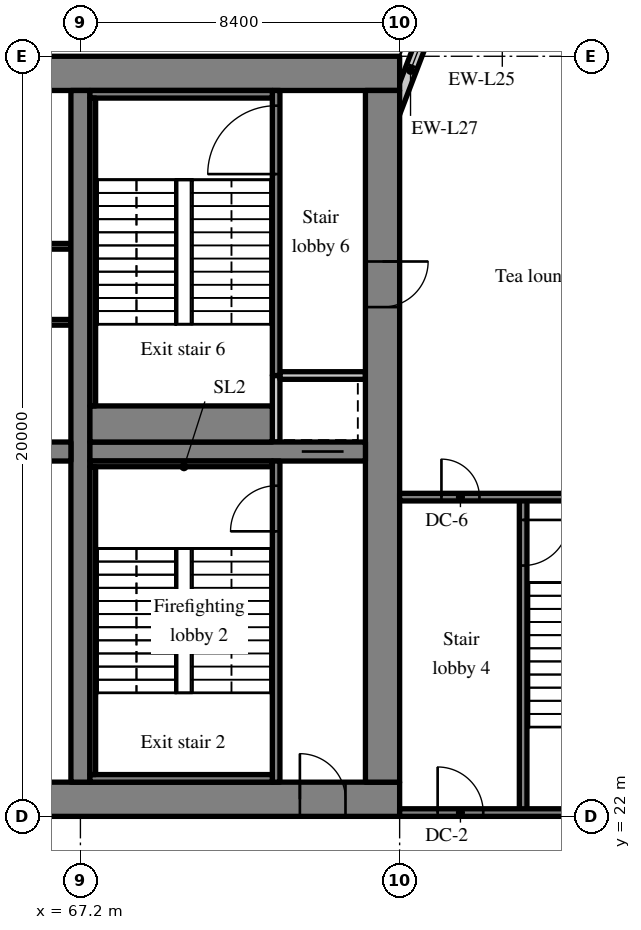
"""IFC4 building model, lengths in metres.
Left out: names, types, materials, properties, quantities, classifications, styles, units other than length and angle.
Written with IfcOpenShell. Run it as: python <this file> out.ifc"""

import sys

from ifc_helpers import new_model, si_unit, direction, frame, frame_2d, origin, place, context, subcontext, project, spatial, rectangle, extrude, source, transform, mapped, element, fill, save


model = new_model("IFC4")
c1 = context("Model", 3, precision=1e-05, world=origin(), true_north=direction((0.0, 1.0)))
c2 = subcontext(c1, "Body", "Model", "MODEL_VIEW")
j1 = project(units=[si_unit("LENGTHUNIT", "METRE"), si_unit("PLANEANGLEUNIT", "RADIAN")], contexts=[c1])
p1 = place(None, origin())
s1 = spatial("IfcSite", under=j1, at=p1, CompositionType="ELEMENT")
p2 = place(p1, origin())
s2 = spatial("IfcBuilding", under=s1, at=p2, CompositionType="ELEMENT")
p3 = place(p2, frame((0.0, 0.0, 118.0)))
s3 = spatial("IfcBuildingStorey", under=s2, at=p3, CompositionType="ELEMENT", Elevation=118.0)
m1 = source(origin(), c2, "Body", "SweptSolid", [
    extrude(rectangle(XDim=50.4, YDim=0.9, at=frame_2d((25.2, 0.0))), origin(), (0.0, 0.0, 1.0), 3.52),
])
p4 = place(p3, frame((25.2, 22.45, 0.0), z_axis=(0.0, 0.0, 1.0), x_axis=(1.0, 0.0, 0.0)))
e1 = element("IfcWall", 1, at=p4, inside=s3, PredefinedType="SHEAR", context=c2, shape_type="MappedRepresentation", body=[
    mapped(m1, transform((0.0, 0.0, 0.0), scale=1.0)),
])
m2 = source(origin(), c2, "Body", "SweptSolid", [
    extrude(rectangle(XDim=1.8, YDim=2.1, at=frame_2d((0.9, 1.05))), frame((0.0, 0.46, 0.0), z_axis=(0.0, -1.0, 0.0), x_axis=(1.0, 0.0, 0.0)), (0.0, 0.0, 1.0), 0.92),
])
p5 = place(p4, frame((15.9, 0.0, 0.0)))
e2 = element("IfcOpeningElement", 2, at=p5, cuts=e1, PredefinedType="OPENING", context=c2, shape_type="MappedRepresentation", body=[
    mapped(m2, transform((0.0, 0.0, 0.0), scale=1.0)),
])
m3 = source(origin(), c2, "Body", "SweptSolid", [
    extrude(rectangle(XDim=1.2, YDim=2.1, at=frame_2d((0.6, 1.05))), frame((0.0, 0.46, 0.0), z_axis=(0.0, -1.0, 0.0), x_axis=(1.0, 0.0, 0.0)), (0.0, 0.0, 1.0), 0.92),
])
p6 = place(p4, frame((26.975, 0.0, 0.0)))
e3 = element("IfcOpeningElement", 3, at=p6, cuts=e1, PredefinedType="OPENING", context=c2, shape_type="MappedRepresentation", body=[
    mapped(m3, transform((0.0, 0.0, 0.0), scale=1.0)),
])
m4 = source(origin(), c2, "Body", "SweptSolid", [
    extrude(rectangle(XDim=0.9, YDim=2.1, at=frame_2d((0.45, 1.05))), frame((0.0, 0.46, 0.0), z_axis=(0.0, -1.0, 0.0), x_axis=(1.0, 0.0, 0.0)), (0.0, 0.0, 1.0), 0.92),
])
p7 = place(p4, frame((33.75, 0.0, 0.0)))
e4 = element("IfcOpeningElement", 4, at=p7, cuts=e1, PredefinedType="OPENING", context=c2, shape_type="MappedRepresentation", body=[
    mapped(m4, transform((0.0, 0.0, 0.0), scale=1.0)),
])
p8 = place(p4, frame((30.75, 0.0, 0.0)))
e5 = element("IfcOpeningElement", 5, at=p8, cuts=e1, PredefinedType="OPENING", context=c2, shape_type="MappedRepresentation", body=[
    mapped(m4, transform((0.0, 0.0, 0.0), scale=1.0)),
])
p9 = place(p4, frame((39.788, 0.0, 0.0)))
e6 = element("IfcOpeningElement", 6, at=p9, cuts=e1, PredefinedType="OPENING", context=c2, shape_type="MappedRepresentation", body=[
    mapped(m4, transform((0.0, 0.0, 0.0), scale=1.0)),
])
p10 = place(p4, frame((36.762, 0.0, 0.0)))
e7 = element("IfcOpeningElement", 7, at=p10, cuts=e1, PredefinedType="OPENING", context=c2, shape_type="MappedRepresentation", body=[
    mapped(m4, transform((0.0, 0.0, 0.0), scale=1.0)),
])
p11 = place(p4, frame((6.45, 0.0, 0.0)))
e8 = element("IfcOpeningElement", 8, at=p11, cuts=e1, PredefinedType="OPENING", context=c2, shape_type="MappedRepresentation", body=[
    mapped(m3, transform((0.0, 0.0, 0.0), scale=1.0)),
])
p12 = place(p4, frame((47.775, 0.0, 0.0)))
e9 = element("IfcOpeningElement", 9, at=p12, cuts=e1, PredefinedType="OPENING", context=c2, shape_type="MappedRepresentation", body=[
    mapped(m3, transform((0.0, 0.0, 0.0), scale=1.0)),
])
p13 = place(p3, frame((25.2, 41.55, 0.0), z_axis=(0.0, 0.0, 1.0), x_axis=(1.0, 0.0, 0.0)))
e10 = element("IfcWall", 10, at=p13, inside=s3, PredefinedType="SHEAR", context=c2, shape_type="MappedRepresentation", body=[
    mapped(m1, transform((0.0, 0.0, 0.0), scale=1.0)),
])
m5 = source(origin(), c2, "Body", "SweptSolid", [
    extrude(rectangle(XDim=18.2, YDim=0.9, at=frame_2d((9.1, 0.0))), origin(), (0.0, 0.0, 1.0), 3.52),
])
p14 = place(p3, frame((75.15, 22.9, 0.0), z_axis=(0.0, 0.0, 1.0), x_axis=(0.0, 1.0, 0.0)))
e11 = element("IfcWall", 11, at=p14, inside=s3, PredefinedType="SHEAR", context=c2, shape_type="MappedRepresentation", body=[
    mapped(m5, transform((0.0, 0.0, 0.0), scale=1.0)),
])
p15 = place(p14, frame((12.5, 0.0, 0.0)))
e12 = element("IfcOpeningElement", 12, at=p15, cuts=e11, PredefinedType="OPENING", context=c2, shape_type="MappedRepresentation", body=[
    mapped(m3, transform((0.0, 0.0, 0.0), scale=1.0)),
])
m6 = source(origin(), c2, "Body", "SweptSolid", [
    extrude(rectangle(XDim=18.2, YDim=0.5, at=frame_2d((9.1, 0.0))), origin(), (0.0, 0.0, 1.0), 3.52),
])
p16 = place(p3, frame((67.2, 22.9, 0.0), z_axis=(0.0, 0.0, 1.0), x_axis=(0.0, 1.0, 0.0)))
e13 = element("IfcWall", 13, at=p16, inside=s3, PredefinedType="SHEAR", context=c2, shape_type="MappedRepresentation", body=[
    mapped(m6, transform((0.0, 0.0, 0.0), scale=1.0)),
])
m7 = source(origin(), c2, "Body", "SweptSolid", [
    extrude(rectangle(XDim=16.3, YDim=0.5, at=frame_2d((8.15, 0.0))), origin(), (0.0, 0.0, 1.0), 3.52),
])
p17 = place(p3, frame((50.65, 31.6, 0.0), z_axis=(0.0, 0.0, 1.0), x_axis=(1.0, 0.0, 0.0)))
e14 = element("IfcWall", 14, at=p17, inside=s3, PredefinedType="SHEAR", context=c2, shape_type="MappedRepresentation", body=[
    mapped(m7, transform((0.0, 0.0, 0.0), scale=1.0)),
])
m8 = source(origin(), c2, "Body", "SweptSolid", [
    extrude(rectangle(XDim=1.0, YDim=2.1, at=frame_2d((0.5, 1.05))), frame((0.0, 0.26, 0.0), z_axis=(0.0, -1.0, 0.0), x_axis=(1.0, 0.0, 0.0)), (0.0, 0.0, 1.0), 0.52),
])
p18 = place(p17, frame((0.575, 0.0, 0.0)))
e15 = element("IfcOpeningElement", 15, at=p18, cuts=e14, PredefinedType="OPENING", context=c2, shape_type="MappedRepresentation", body=[
    mapped(m8, transform((0.0, 0.0, 0.0), scale=1.0)),
])
m9 = source(origin(), c2, "Body", "SweptSolid", [
    extrude(rectangle(XDim=7.25, YDim=0.5, at=frame_2d((3.625, 0.0))), origin(), (0.0, 0.0, 1.0), 3.52),
])
p19 = place(p3, frame((67.45, 31.6, 0.0), z_axis=(0.0, 0.0, 1.0), x_axis=(1.0, 0.0, 0.0)))
e16 = element("IfcWall", 16, at=p19, inside=s3, PredefinedType="SHEAR", context=c2, shape_type="MappedRepresentation", body=[
    mapped(m9, transform((0.0, 0.0, 0.0), scale=1.0)),
])
m10 = source(origin(), c2, "Body", "SweptSolid", [
    extrude(rectangle(XDim=1.1, YDim=2.1, at=frame_2d((0.55, 1.05))), frame((0.0, 0.26, 0.0), z_axis=(0.0, -1.0, 0.0), x_axis=(1.0, 0.0, 0.0)), (0.0, 0.0, 1.0), 0.52),
])
p20 = place(p19, frame((5.575, 0.0, 0.0)))
e17 = element("IfcOpeningElement", 17, at=p20, cuts=e16, PredefinedType="OPENING", context=c2, shape_type="MappedRepresentation", body=[
    mapped(m10, transform((0.0, 0.0, 0.0), scale=1.0)),
])
m11 = source(origin(), c2, "Body", "SweptSolid", [
    extrude(rectangle(XDim=3.559, YDim=0.3, at=frame_2d((1.78, 0.0))), origin(), (0.0, 0.0, 1.0), 3.52),
])
p21 = place(p3, frame((76.523, 43.292, 0.0), z_axis=(0.0, 0.0, 1.0), x_axis=(-0.35779745313, -0.933799219604, 0.0)))
e18 = element("IfcWall", 18, at=p21, inside=s3, PredefinedType="SOLIDWALL", context=c2, shape_type="MappedRepresentation", body=[
    mapped(m11, transform((0.0, 0.0, 0.0), scale=1.0)),
])
m12 = source(origin(), c2, "Body", "SweptSolid", [
    extrude(rectangle(XDim=1.5, YDim=2.0, at=frame_2d((0.75, 1.0))), frame((0.0, 0.16, 0.0), z_axis=(0.0, -1.0, 0.0), x_axis=(1.0, 0.0, 0.0)), (0.0, 0.0, 1.0), 0.32),
])
p22 = place(p21, frame((0.156, 0.0, 0.9)))
e19 = element("IfcOpeningElement", 19, at=p22, cuts=e18, PredefinedType="OPENING", context=c2, shape_type="MappedRepresentation", body=[
    mapped(m12, transform((0.0, 0.0, 0.0), scale=1.0)),
])
m13 = source(origin(), c2, "Body", "SweptSolid", [
    extrude(rectangle(XDim=14.15, YDim=0.15, at=frame_2d((7.075, 0.0))), origin(), (0.0, 0.0, 1.0), 3.52),
])
p23 = place(p3, frame((66.95, 35.0, 0.0), z_axis=(0.0, 0.0, 1.0), x_axis=(-1.0, 0.0, 0.0)))
e20 = element("IfcWall", 20, at=p23, inside=s3, PredefinedType="PARTITIONING", context=c2, shape_type="MappedRepresentation", body=[
    mapped(m13, transform((0.0, 0.0, 0.0), scale=1.0)),
])
m14 = source(origin(), c2, "Body", "SweptSolid", [
    extrude(rectangle(XDim=0.9, YDim=2.1, at=frame_2d((0.45, 1.05))), frame((0.0, 0.085, 0.0), z_axis=(0.0, -1.0, 0.0), x_axis=(1.0, 0.0, 0.0)), (0.0, 0.0, 1.0), 0.17),
])
p24 = place(p23, frame((2.013, 0.0, 0.0)))
e21 = element("IfcOpeningElement", 21, at=p24, cuts=e20, PredefinedType="OPENING", context=c2, shape_type="MappedRepresentation", body=[
    mapped(m14, transform((0.0, 0.0, 0.0), scale=1.0)),
])
p25 = place(p23, frame((9.051, 0.0, 0.0)))
e22 = element("IfcOpeningElement", 22, at=p25, cuts=e20, PredefinedType="OPENING", context=c2, shape_type="MappedRepresentation", body=[
    mapped(m14, transform((0.0, 0.0, 0.0), scale=1.0)),
])
m15 = source(origin(), c2, "Body", "SweptSolid", [
    extrude(rectangle(XDim=16.3, YDim=0.15, at=frame_2d((8.15, 0.0))), origin(), (0.0, 0.0, 1.0), 3.52),
])
p26 = place(p3, frame((66.95, 37.0, 0.0), z_axis=(0.0, 0.0, 1.0), x_axis=(-1.0, 0.0, 0.0)))
e23 = element("IfcWall", 23, at=p26, inside=s3, PredefinedType="PARTITIONING", context=c2, shape_type="MappedRepresentation", body=[
    mapped(m15, transform((0.0, 0.0, 0.0), scale=1.0)),
])
p27 = place(p26, frame((1.588, 0.0, 0.0)))
e24 = element("IfcOpeningElement", 24, at=p27, cuts=e23, PredefinedType="OPENING", context=c2, shape_type="MappedRepresentation", body=[
    mapped(m14, transform((0.0, 0.0, 0.0), scale=1.0)),
])
p28 = place(p26, frame((7.293, 0.0, 0.0)))
e25 = element("IfcOpeningElement", 25, at=p28, cuts=e23, PredefinedType="OPENING", context=c2, shape_type="MappedRepresentation", body=[
    mapped(m14, transform((0.0, 0.0, 0.0), scale=1.0)),
])
p29 = place(p26, frame((12.183, 0.0, 0.0)))
e26 = element("IfcOpeningElement", 26, at=p29, cuts=e23, PredefinedType="OPENING", context=c2, shape_type="MappedRepresentation", body=[
    mapped(m14, transform((0.0, 0.0, 0.0), scale=1.0)),
])
p30 = place(p26, frame((14.627, 0.0, 0.0)))
e27 = element("IfcOpeningElement", 27, at=p30, cuts=e23, PredefinedType="OPENING", context=c2, shape_type="MappedRepresentation", body=[
    mapped(m14, transform((0.0, 0.0, 0.0), scale=1.0)),
])
m16 = source(origin(), c2, "Body", "SweptSolid", [
    extrude(rectangle(XDim=8.45, YDim=0.2, at=frame_2d((4.225, 0.0))), origin(), (0.0, 0.0, 1.0), 3.52),
])
p31 = place(p3, frame((72.35, 22.9, 0.0), z_axis=(0.0, 0.0, 1.0), x_axis=(0.0, 1.0, 0.0)))
e28 = element("IfcWall", 28, at=p31, inside=s3, PredefinedType="SOLIDWALL", context=c2, shape_type="MappedRepresentation", body=[
    mapped(m16, transform((0.0, 0.0, 0.0), scale=1.0)),
])
m17 = source(origin(), c2, "Body", "SweptSolid", [
    extrude(rectangle(XDim=1.2, YDim=2.1, at=frame_2d((0.6, 1.05))), frame((0.0, 0.11, 0.0), z_axis=(0.0, -1.0, 0.0), x_axis=(1.0, 0.0, 0.0)), (0.0, 0.0, 1.0), 0.22),
])
p32 = place(p31, frame((6.6, 0.0, 0.0)))
e29 = element("IfcOpeningElement", 29, at=p32, cuts=e28, PredefinedType="OPENING", context=c2, shape_type="MappedRepresentation", body=[
    mapped(m17, transform((0.0, 0.0, 0.0), scale=1.0)),
])
m18 = source(origin(), c2, "Body", "SweptSolid", [
    extrude(rectangle(XDim=1.75, YDim=0.2, at=frame_2d((0.875, 0.0))), origin(), (0.0, 0.0, 1.0), 3.52),
])
p33 = place(p3, frame((72.35, 31.85, 0.0), z_axis=(0.0, 0.0, 1.0), x_axis=(0.0, 1.0, 0.0)))
e30 = element("IfcWall", 30, at=p33, inside=s3, PredefinedType="SOLIDWALL", context=c2, shape_type="MappedRepresentation", body=[
    mapped(m18, transform((0.0, 0.0, 0.0), scale=1.0)),
])
m19 = source(origin(), c2, "Body", "SweptSolid", [
    extrude(rectangle(XDim=2.25, YDim=0.2, at=frame_2d((1.125, 0.0))), origin(), (0.0, 0.0, 1.0), 3.52),
])
p34 = place(p3, frame((72.45, 33.6, 0.0), z_axis=(0.0, 0.0, 1.0), x_axis=(1.0, 0.0, 0.0)))
e31 = element("IfcWall", 31, at=p34, inside=s3, PredefinedType="SOLIDWALL", context=c2, shape_type="MappedRepresentation", body=[
    mapped(m19, transform((0.0, 0.0, 0.0), scale=1.0)),
])
m20 = source(origin(), c2, "Body", "SweptSolid", [
    extrude(rectangle(XDim=7.5, YDim=0.2, at=frame_2d((3.75, 0.0))), origin(), (0.0, 0.0, 1.0), 3.52),
])
p35 = place(p3, frame((72.35, 33.6, 0.0), z_axis=(0.0, 0.0, 1.0), x_axis=(0.0, 1.0, 0.0)))
e32 = element("IfcWall", 32, at=p35, inside=s3, PredefinedType="SOLIDWALL", context=c2, shape_type="MappedRepresentation", body=[
    mapped(m20, transform((0.0, 0.0, 0.0), scale=1.0)),
])
m21 = source(origin(), c2, "Body", "SweptSolid", [
    extrude(rectangle(XDim=1.8, YDim=2.1, at=frame_2d((0.9, 1.05))), frame((0.0, 0.11, 0.0), z_axis=(0.0, -1.0, 0.0), x_axis=(1.0, 0.0, 0.0)), (0.0, 0.0, 1.0), 0.22),
])
p36 = place(p35, frame((5.3, 0.0, 0.0)))
e33 = element("IfcOpeningElement", 33, at=p36, cuts=e32, PredefinedType="OPENING", context=c2, shape_type="MappedRepresentation", body=[
    mapped(m21, transform((0.0, 0.0, 0.0), scale=1.0)),
])
m22 = source(origin(), c2, "Body", "SweptSolid", [
    extrude(rectangle(XDim=8.3, YDim=0.2, at=frame_2d((4.15, 0.0))), origin(), (0.0, 0.0, 1.0), 3.52),
])
p37 = place(p3, frame((78.85, 22.1, 0.0), z_axis=(0.0, 0.0, 1.0), x_axis=(0.0, 1.0, 0.0)))
e34 = element("IfcWall", 34, at=p37, inside=s3, PredefinedType="SOLIDWALL", context=c2, shape_type="MappedRepresentation", body=[
    mapped(m22, transform((0.0, 0.0, 0.0), scale=1.0)),
])
p38 = place(p37, frame((6.5, 0.0, 0.0)))
e35 = element("IfcOpeningElement", 35, at=p38, cuts=e34, PredefinedType="OPENING", context=c2, shape_type="MappedRepresentation", body=[
    mapped(m17, transform((0.0, 0.0, 0.0), scale=1.0)),
])
m23 = source(origin(), c2, "Body", "SweptSolid", [
    extrude(rectangle(XDim=8.225, YDim=0.2, at=frame_2d((4.112, 0.0))), origin(), (0.0, 0.0, 1.0), 3.52),
])
p39 = place(p3, frame((83.825, 22.1, 0.0), z_axis=(0.0, 0.0, 1.0), x_axis=(-1.0, 0.0, 0.0)))
e36 = element("IfcWall", 36, at=p39, inside=s3, PredefinedType="SOLIDWALL", context=c2, shape_type="MappedRepresentation", body=[
    mapped(m23, transform((0.0, 0.0, 0.0), scale=1.0)),
])
p40 = place(p39, frame((6.025, 0.0, 0.0)))
e37 = element("IfcOpeningElement", 37, at=p40, cuts=e36, PredefinedType="OPENING", context=c2, shape_type="MappedRepresentation", body=[
    mapped(m17, transform((0.0, 0.0, 0.0), scale=1.0)),
])
p41 = place(p3, frame((83.825, 30.4, 0.0), z_axis=(0.0, 0.0, 1.0), x_axis=(-1.0, 0.0, 0.0)))
e38 = element("IfcWall", 38, at=p41, inside=s3, PredefinedType="SOLIDWALL", context=c2, shape_type="MappedRepresentation", body=[
    mapped(m23, transform((0.0, 0.0, 0.0), scale=1.0)),
])
m24 = source(origin(), c2, "Body", "SweptSolid", [
    extrude(rectangle(XDim=1.0, YDim=2.1, at=frame_2d((0.5, 1.05))), frame((0.0, 0.11, 0.0), z_axis=(0.0, -1.0, 0.0), x_axis=(1.0, 0.0, 0.0)), (0.0, 0.0, 1.0), 0.22),
])
p42 = place(p41, frame((6.125, 0.0, 0.0)))
e39 = element("IfcOpeningElement", 39, at=p42, cuts=e38, PredefinedType="OPENING", context=c2, shape_type="MappedRepresentation", body=[
    mapped(m24, transform((0.0, 0.0, 0.0), scale=1.0)),
])
m25 = source(origin(), c2, "Body", "SweptSolid", [
    extrude(rectangle(XDim=4.8, YDim=0.2, at=frame_2d((2.4, 0.0))), origin(), (0.0, 0.0, 1.0), 3.52),
])
p43 = place(p3, frame((67.45, 23.0, 0.0), z_axis=(0.0, 0.0, 1.0), x_axis=(1.0, 0.0, 0.0)))
e40 = element("IfcWall", 40, at=p43, inside=s3, PredefinedType="SOLIDWALL", context=c2, shape_type="MappedRepresentation", body=[
    mapped(m25, transform((0.0, 0.0, 0.0), scale=1.0)),
])
m26 = source(origin(), c2, "Body", "SweptSolid", [
    extrude(rectangle(XDim=4.8, YDim=0.15, at=frame_2d((2.4, 0.0))), origin(), (0.0, 0.0, 1.0), 3.52),
])
p44 = place(p3, frame((67.45, 31.275, 0.0), z_axis=(0.0, 0.0, 1.0), x_axis=(1.0, 0.0, 0.0)))
e41 = element("IfcWall", 41, at=p44, inside=s3, PredefinedType="SOLIDWALL", context=c2, shape_type="MappedRepresentation", body=[
    mapped(m26, transform((0.0, 0.0, 0.0), scale=1.0)),
])
m27 = source(origin(), c2, "Body", "SweptSolid", [
    extrude(rectangle(XDim=8.1, YDim=0.15, at=frame_2d((4.05, 0.0))), origin(), (0.0, 0.0, 1.0), 3.52),
])
p45 = place(p3, frame((67.525, 23.1, 0.0), z_axis=(0.0, 0.0, 1.0), x_axis=(0.0, 1.0, 0.0)))
e42 = element("IfcWall", 42, at=p45, inside=s3, PredefinedType="SOLIDWALL", context=c2, shape_type="MappedRepresentation", body=[
    mapped(m27, transform((0.0, 0.0, 0.0), scale=1.0)),
])
p46 = place(p3, frame((67.45, 41.0, 0.0), z_axis=(0.0, 0.0, 1.0), x_axis=(1.0, 0.0, 0.0)))
e43 = element("IfcWall", 43, at=p46, inside=s3, PredefinedType="SOLIDWALL", context=c2, shape_type="MappedRepresentation", body=[
    mapped(m25, transform((0.0, 0.0, 0.0), scale=1.0)),
])
m28 = source(origin(), c2, "Body", "SweptSolid", [
    extrude(rectangle(XDim=4.8, YDim=0.95, at=frame_2d((2.4, 0.0))), origin(), (0.0, 0.0, 1.0), 3.52),
])
p47 = place(p3, frame((67.45, 32.325, 0.0), z_axis=(0.0, 0.0, 1.0), x_axis=(1.0, 0.0, 0.0)))
e44 = element("IfcWall", 44, at=p47, inside=s3, PredefinedType="SOLIDWALL", context=c2, shape_type="MappedRepresentation", body=[
    mapped(m28, transform((0.0, 0.0, 0.0), scale=1.0)),
])
p48 = place(p3, frame((67.525, 32.8, 0.0), z_axis=(0.0, 0.0, 1.0), x_axis=(0.0, 1.0, 0.0)))
e45 = element("IfcWall", 45, at=p48, inside=s3, PredefinedType="SOLIDWALL", context=c2, shape_type="MappedRepresentation", body=[
    mapped(m27, transform((0.0, 0.0, 0.0), scale=1.0)),
])
m29 = source(origin(), c2, "Body", "SweptSolid", [
    extrude(rectangle(XDim=1.5, YDim=2.0, at=frame_2d((0.75, 1.0))), frame((0.0, 0.03, 0.0), z_axis=(0.0, -1.0, 0.0), x_axis=(1.0, 0.0, 0.0)), (0.0, 0.0, 1.0), 0.06),
])
p49 = place(p22, origin())
e46 = element("IfcWindow", 46, at=p49, inside=s3, PartitioningType="SINGLE_PANEL", PredefinedType="WINDOW", context=c2, shape_type="MappedRepresentation", body=[
    mapped(m29, transform((0.0, 0.0, 0.0), scale=1.0)),
])
fill(e19, e46)
m30 = source(origin(), c2, "Body", "SweptSolid", [
    extrude(rectangle(XDim=1.2, YDim=2.1, at=frame_2d((0.6, 1.05))), frame((0.0, 0.025, 0.0), z_axis=(0.0, -1.0, 0.0), x_axis=(1.0, 0.0, 0.0)), (0.0, 0.0, 1.0), 0.05),
])
p50 = place(p32, origin())
e47 = element("IfcDoor", 47, at=p50, inside=s3, OperationType="SINGLE_SWING_LEFT", PredefinedType="DOOR", context=c2, shape_type="MappedRepresentation", body=[
    mapped(m30, transform((0.0, 0.0, 0.0), scale=1.0)),
])
fill(e29, e47)
m31 = source(origin(), c2, "Body", "SweptSolid", [
    extrude(rectangle(XDim=1.2, YDim=2.1, at=frame_2d((0.6, 1.05))), frame((0.0, 0.375, 0.0), z_axis=(0.0, -1.0, 0.0), x_axis=(1.0, 0.0, 0.0)), (0.0, 0.0, 1.0), 0.05),
])
p51 = place(p12, origin())
e48 = element("IfcDoor", 48, at=p51, inside=s3, OperationType="SINGLE_SWING_LEFT", PredefinedType="DOOR", context=c2, shape_type="MappedRepresentation", body=[
    mapped(m31, transform((0.0, 0.0, 0.0), scale=1.0)),
])
fill(e9, e48)
m32 = source(origin(), c2, "Body", "SweptSolid", [
    extrude(rectangle(XDim=1.1, YDim=2.1, at=frame_2d((0.55, 1.05))), frame((0.0, 0.025, 0.0), z_axis=(0.0, -1.0, 0.0), x_axis=(1.0, 0.0, 0.0)), (0.0, 0.0, 1.0), 0.05),
])
p52 = place(p20, origin())
e49 = element("IfcDoor", 49, at=p52, inside=s3, OperationType="SLIDING_TO_RIGHT", PredefinedType="DOOR", context=c2, shape_type="MappedRepresentation", body=[
    mapped(m32, transform((0.0, 0.0, 0.0), scale=1.0)),
])
fill(e17, e49)
m33 = source(origin(), c2, "Body", "SweptSolid", [
    extrude(rectangle(XDim=1.8, YDim=2.1, at=frame_2d((0.9, 1.05))), frame((0.0, 0.025, 0.0), z_axis=(0.0, -1.0, 0.0), x_axis=(1.0, 0.0, 0.0)), (0.0, 0.0, 1.0), 0.05),
])
p53 = place(p36, origin())
e50 = element("IfcDoor", 50, at=p53, inside=s3, OperationType="SINGLE_SWING_LEFT", PredefinedType="DOOR", context=c2, shape_type="MappedRepresentation", body=[
    mapped(m33, transform((0.0, 0.0, 0.0), scale=1.0)),
])
fill(e33, e50)
p54 = place(p15, origin())
e51 = element("IfcDoor", 51, at=p54, inside=s3, OperationType="SINGLE_SWING_RIGHT", PredefinedType="DOOR", context=c2, shape_type="MappedRepresentation", body=[
    mapped(m30, transform((0.0, 0.0, 0.0), scale=1.0)),
])
fill(e12, e51)
p55 = place(p38, origin())
e52 = element("IfcDoor", 52, at=p55, inside=s3, OperationType="SINGLE_SWING_RIGHT", PredefinedType="DOOR", context=c2, shape_type="MappedRepresentation", body=[
    mapped(m30, transform((0.0, 0.0, 0.0), scale=1.0)),
])
fill(e35, e52)
p56 = place(p40, origin())
e53 = element("IfcDoor", 53, at=p56, inside=s3, OperationType="SINGLE_SWING_RIGHT", PredefinedType="DOOR", context=c2, shape_type="MappedRepresentation", body=[
    mapped(m30, transform((0.0, 0.0, 0.0), scale=1.0)),
])
fill(e37, e53)
m34 = source(origin(), c2, "Body", "SweptSolid", [
    extrude(rectangle(XDim=1.0, YDim=2.1, at=frame_2d((0.5, 1.05))), frame((0.0, 0.025, 0.0), z_axis=(0.0, -1.0, 0.0), x_axis=(1.0, 0.0, 0.0)), (0.0, 0.0, 1.0), 0.05),
])
p57 = place(p42, origin())
e54 = element("IfcDoor", 54, at=p57, inside=s3, OperationType="SINGLE_SWING_RIGHT", PredefinedType="DOOR", context=c2, shape_type="MappedRepresentation", body=[
    mapped(m34, transform((0.0, 0.0, 0.0), scale=1.0)),
])
fill(e39, e54)
save(model, sys.argv[1])
